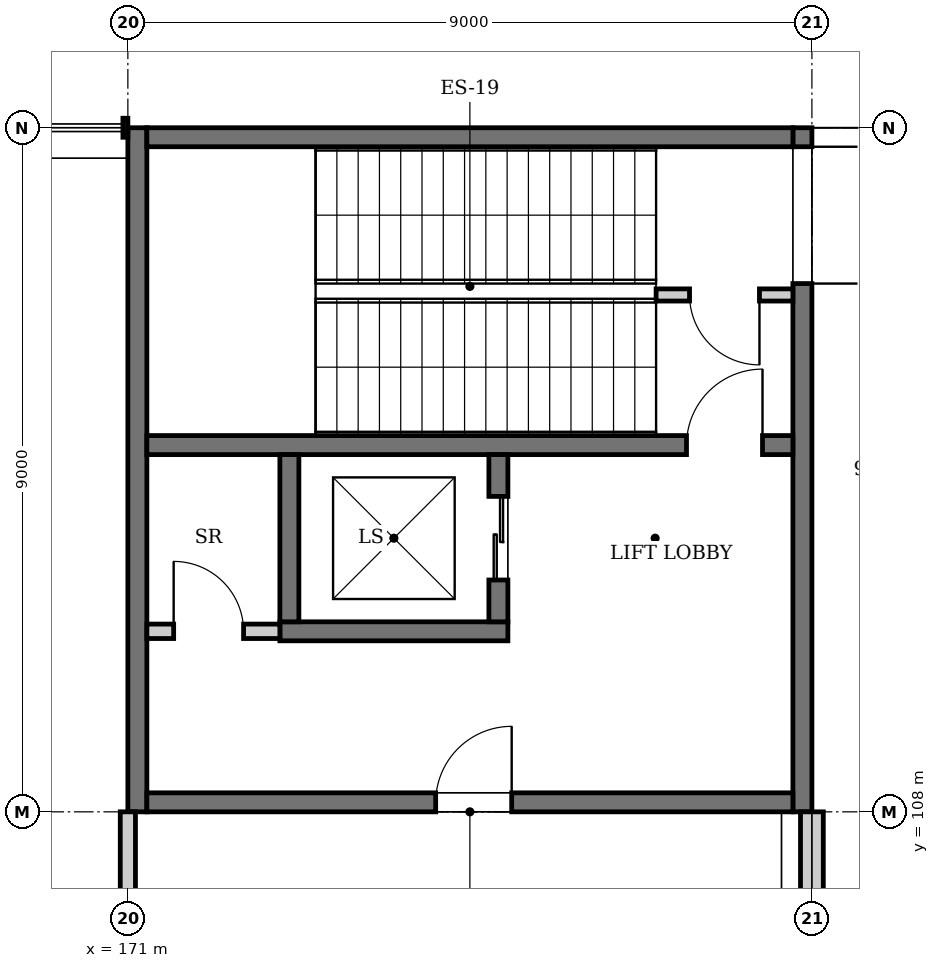
"""IFC4 building model, lengths in metres.
Left out: names, types, materials, properties, quantities, classifications, styles, units other than length and angle.
Written with IfcOpenShell. Run it as: python <this file> out.ifc"""

import sys

from ifc_helpers import new_model, si_unit, direction, frame, frame_2d, origin, place, context, subcontext, project, spatial, rectangle, extrude, element, fill, save


model = new_model("IFC4")
c1 = context("Model", 3, precision=1e-05, world=origin(), true_north=direction((0.0, 1.0)))
c2 = subcontext(c1, "Body", "Model", "MODEL_VIEW")
j1 = project(units=[si_unit("LENGTHUNIT", "METRE"), si_unit("PLANEANGLEUNIT", "RADIAN")], contexts=[c1])
p1 = place(None, origin())
s1 = spatial("IfcSite", under=j1, at=p1, CompositionType="ELEMENT")
p2 = place(p1, origin())
s2 = spatial("IfcBuilding", under=s1, at=p2, CompositionType="ELEMENT")
p3 = place(p2, origin())
s3 = spatial("IfcBuildingStorey", under=s2, at=p3, CompositionType="ELEMENT", Elevation=0.0)
p4 = place(p3, frame((171.125, 108.0, 0.0), z_axis=(0.0, 0.0, 1.0), x_axis=(0.0, 1.0, 0.0)))
e1 = element("IfcWall", 1, at=p4, inside=s3, PredefinedType="SHEAR", context=c2, shape_type="SweptSolid", body=[
    extrude(rectangle(XDim=9.0, YDim=0.25, at=frame_2d((4.5, 0.0))), origin(), (0.0, 0.0, 1.0), 6.0),
])
p5 = place(p3, frame((179.875, 108.0, 0.0), z_axis=(0.0, 0.0, 1.0), x_axis=(0.0, 1.0, 0.0)))
e2 = element("IfcWall", 2, at=p5, inside=s3, PredefinedType="SHEAR", context=c2, shape_type="SweptSolid", body=[
    extrude(rectangle(XDim=9.0, YDim=0.25, at=frame_2d((4.5, 0.0))), origin(), (0.0, 0.0, 1.0), 6.0),
])
p6 = place(p5, frame((6.95, 0.0, 0.0)))
e3 = element("IfcOpeningElement", 3, at=p6, cuts=e2, PredefinedType="OPENING", context=c2, shape_type="SweptSolid", body=[
    extrude(rectangle(XDim=1.8, YDim=2.4, at=frame_2d((0.9, 1.2))), frame((0.0, 0.135, 0.0), z_axis=(0.0, -1.0, 0.0), x_axis=(1.0, 0.0, 0.0)), (0.0, 0.0, 1.0), 0.27),
])
p7 = place(p3, frame((171.25, 108.125, 0.0), z_axis=(0.0, 0.0, 1.0), x_axis=(1.0, 0.0, 0.0)))
e4 = element("IfcWall", 4, at=p7, inside=s3, PredefinedType="SHEAR", context=c2, shape_type="SweptSolid", body=[
    extrude(rectangle(XDim=8.5, YDim=0.25, at=frame_2d((4.25, 0.0))), origin(), (0.0, 0.0, 1.0), 6.0),
])
p8 = place(p7, frame((3.8, 0.0, 0.0)))
e5 = element("IfcOpeningElement", 5, at=p8, cuts=e4, PredefinedType="OPENING", context=c2, shape_type="SweptSolid", body=[
    extrude(rectangle(XDim=1.0, YDim=2.1, at=frame_2d((0.5, 1.05))), frame((0.0, 0.135, 0.0), z_axis=(0.0, -1.0, 0.0), x_axis=(1.0, 0.0, 0.0)), (0.0, 0.0, 1.0), 0.27),
])
p9 = place(p3, frame((171.25, 116.875, 0.0), z_axis=(0.0, 0.0, 1.0), x_axis=(1.0, 0.0, 0.0)))
e6 = element("IfcWall", 6, at=p9, inside=s3, PredefinedType="SHEAR", context=c2, shape_type="SweptSolid", body=[
    extrude(rectangle(XDim=8.5, YDim=0.25, at=frame_2d((4.25, 0.0))), origin(), (0.0, 0.0, 1.0), 6.0),
])
p10 = place(p3, frame((180.0, 99.154, 0.0), z_axis=(0.0, 0.0, 1.0), x_axis=(0.0, 1.0, 0.0)))
e7 = element("IfcWall", 7, at=p10, inside=s3, PredefinedType="SOLIDWALL", context=c2, shape_type="SweptSolid", body=[
    extrude(rectangle(XDim=8.846, YDim=0.3, at=frame_2d((4.423, 0.0))), origin(), (0.0, 0.0, 1.0), 5.444),
])
p11 = place(p10, frame((1.646, 0.0, 0.6)))
e8 = element("IfcOpeningElement", 8, at=p11, cuts=e7, PredefinedType="OPENING", context=c2, shape_type="SweptSolid", body=[
    extrude(rectangle(XDim=0.9, YDim=2.7, at=frame_2d((0.45, 1.35))), frame((0.0, 0.16, 0.0), z_axis=(0.0, -1.0, 0.0), x_axis=(1.0, 0.0, 0.0)), (0.0, 0.0, 1.0), 0.32),
])
p12 = place(p10, frame((6.146, 0.0, 0.6)))
e9 = element("IfcOpeningElement", 9, at=p12, cuts=e7, PredefinedType="OPENING", context=c2, shape_type="SweptSolid", body=[
    extrude(rectangle(XDim=0.9, YDim=2.7, at=frame_2d((0.45, 1.35))), frame((0.0, 0.16, 0.0), z_axis=(0.0, -1.0, 0.0), x_axis=(1.0, 0.0, 0.0)), (0.0, 0.0, 1.0), 0.32),
])
p13 = place(p3, frame((179.75, 112.825, 0.0), z_axis=(0.0, 0.0, 1.0), x_axis=(-1.0, 0.0, 0.0)))
e10 = element("IfcWall", 10, at=p13, inside=s3, PredefinedType="SOLIDWALL", context=c2, shape_type="SweptSolid", body=[
    extrude(rectangle(XDim=8.5, YDim=0.25, at=frame_2d((4.25, 0.0))), origin(), (0.0, 0.0, 1.0), 5.75),
])
p14 = place(p13, frame((0.4, 0.0, 0.0)))
e11 = element("IfcOpeningElement", 11, at=p14, cuts=e10, PredefinedType="OPENING", context=c2, shape_type="SweptSolid", body=[
    extrude(rectangle(XDim=1.0, YDim=2.1, at=frame_2d((0.5, 1.05))), frame((0.0, 0.135, 0.0), z_axis=(0.0, -1.0, 0.0), x_axis=(1.0, 0.0, 0.0)), (0.0, 0.0, 1.0), 0.27),
])
p15 = place(p3, frame((173.0, 110.375, 0.0), z_axis=(0.0, 0.0, 1.0), x_axis=(1.0, 0.0, 0.0)))
e12 = element("IfcWall", 12, at=p15, inside=s3, PredefinedType="SOLIDWALL", context=c2, shape_type="SweptSolid", body=[
    extrude(rectangle(XDim=3.0, YDim=0.25, at=frame_2d((1.5, 0.0))), origin(), (0.0, 0.0, 1.0), 6.0),
])
p16 = place(p3, frame((173.125, 110.5, 0.0), z_axis=(0.0, 0.0, 1.0), x_axis=(0.0, 1.0, 0.0)))
e13 = element("IfcWall", 13, at=p16, inside=s3, PredefinedType="SOLIDWALL", context=c2, shape_type="SweptSolid", body=[
    extrude(rectangle(XDim=2.2, YDim=0.25, at=frame_2d((1.1, 0.0))), origin(), (0.0, 0.0, 1.0), 6.0),
])
p17 = place(p3, frame((175.875, 110.5, 0.0), z_axis=(0.0, 0.0, 1.0), x_axis=(0.0, 1.0, 0.0)))
e14 = element("IfcWall", 14, at=p17, inside=s3, PredefinedType="SOLIDWALL", context=c2, shape_type="SweptSolid", body=[
    extrude(rectangle(XDim=2.2, YDim=0.25, at=frame_2d((1.1, 0.0))), origin(), (0.0, 0.0, 1.0), 6.0),
])
p18 = place(p17, frame((0.55, 0.0, 0.0)))
e15 = element("IfcOpeningElement", 15, at=p18, cuts=e14, PredefinedType="OPENING", context=c2, shape_type="SweptSolid", body=[
    extrude(rectangle(XDim=1.1, YDim=2.1, at=frame_2d((0.55, 1.05))), frame((0.0, 0.135, 0.0), z_axis=(0.0, -1.0, 0.0), x_axis=(1.0, 0.0, 0.0)), (0.0, 0.0, 1.0), 0.27),
])
p19 = place(p3, frame((179.75, 114.8, 0.0), z_axis=(0.0, 0.0, 1.0), x_axis=(-1.0, 0.0, 0.0)))
e16 = element("IfcWall", 16, at=p19, inside=s3, PredefinedType="PARTITIONING", context=c2, shape_type="SweptSolid", body=[
    extrude(rectangle(XDim=1.8, YDim=0.16, at=frame_2d((0.9, 0.0))), origin(), (0.0, 0.0, 1.0), 5.75),
])
p20 = place(p19, frame((0.44, 0.0, 0.0)))
e17 = element("IfcOpeningElement", 17, at=p20, cuts=e16, PredefinedType="OPENING", context=c2, shape_type="SweptSolid", body=[
    extrude(rectangle(XDim=0.92, YDim=2.1, at=frame_2d((0.46, 1.05))), frame((0.0, 0.09, 0.0), z_axis=(0.0, -1.0, 0.0), x_axis=(1.0, 0.0, 0.0)), (0.0, 0.0, 1.0), 0.18),
])
p21 = place(p3, frame((171.25, 110.375, 0.0), z_axis=(0.0, 0.0, 1.0), x_axis=(1.0, 0.0, 0.0)))
e18 = element("IfcWall", 18, at=p21, inside=s3, PredefinedType="PARTITIONING", context=c2, shape_type="SweptSolid", body=[
    extrude(rectangle(XDim=1.75, YDim=0.19, at=frame_2d((0.875, 0.0))), origin(), (0.0, 0.0, 1.0), 5.75),
])
p22 = place(p21, frame((0.353, 0.0, 0.0)))
e19 = element("IfcOpeningElement", 19, at=p22, cuts=e18, PredefinedType="OPENING", context=c2, shape_type="SweptSolid", body=[
    extrude(rectangle(XDim=0.92, YDim=2.1, at=frame_2d((0.46, 1.05))), frame((0.0, 0.105, 0.0), z_axis=(0.0, -1.0, 0.0), x_axis=(1.0, 0.0, 0.0)), (0.0, 0.0, 1.0), 0.21),
])
p23 = place(p3, frame((171.0, 99.164, 0.0), z_axis=(0.0, 0.0, 1.0), x_axis=(0.0, 1.0, 0.0)))
e20 = element("IfcWall", 20, at=p23, inside=s3, PredefinedType="PARTITIONING", context=c2, shape_type="SweptSolid", body=[
    extrude(rectangle(XDim=8.836, YDim=0.2, at=frame_2d((4.418, 0.0))), origin(), (0.0, 0.0, 1.0), 5.322),
])
p24 = place(p23, frame((3.886, 0.0, 0.0)))
e21 = element("IfcOpeningElement", 21, at=p24, cuts=e20, PredefinedType="OPENING", context=c2, shape_type="SweptSolid", body=[
    extrude(rectangle(XDim=1.0, YDim=2.1, at=frame_2d((0.5, 1.05))), frame((0.0, 0.11, 0.0), z_axis=(0.0, -1.0, 0.0), x_axis=(1.0, 0.0, 0.0)), (0.0, 0.0, 1.0), 0.22),
])
p25 = place(p6, frame((1.8, 0.0, 0.0), z_axis=(0.0, 0.0, 1.0), x_axis=(-1.0, 0.0, 0.0)))
e22 = element("IfcDoor", 22, at=p25, inside=s3, OperationType="DOUBLE_DOOR_SINGLE_SWING", PredefinedType="DOOR", context=c2, shape_type="SweptSolid", body=[
    extrude(rectangle(XDim=1.8, YDim=2.4, at=frame_2d((0.9, 1.2))), frame((0.0, 0.025, 0.0), z_axis=(0.0, -1.0, 0.0), x_axis=(1.0, 0.0, 0.0)), (0.0, 0.0, 1.0), 0.05),
])
fill(e3, e22)
p26 = place(p18, origin())
e23 = element("IfcDoor", 23, at=p26, inside=s3, OperationType="DOUBLE_DOOR_SLIDING", PredefinedType="DOOR", context=c2, shape_type="SweptSolid", body=[
    extrude(rectangle(XDim=1.1, YDim=2.1, at=frame_2d((0.55, 1.05))), frame((0.0, 0.025, 0.0), z_axis=(0.0, -1.0, 0.0), x_axis=(1.0, 0.0, 0.0)), (0.0, 0.0, 1.0), 0.05),
])
fill(e15, e23)
p27 = place(p14, frame((1.0, 0.0, 0.0), z_axis=(0.0, 0.0, 1.0), x_axis=(-1.0, 0.0, 0.0)))
e24 = element("IfcDoor", 24, at=p27, inside=s3, OperationType="SINGLE_SWING_RIGHT", PredefinedType="DOOR", context=c2, shape_type="SweptSolid", body=[
    extrude(rectangle(XDim=1.0, YDim=2.1, at=frame_2d((0.5, 1.05))), frame((0.0, 0.025, 0.0), z_axis=(0.0, -1.0, 0.0), x_axis=(1.0, 0.0, 0.0)), (0.0, 0.0, 1.0), 0.05),
])
fill(e11, e24)
p28 = place(p22, origin())
e25 = element("IfcDoor", 25, at=p28, inside=s3, OperationType="SINGLE_SWING_LEFT", PredefinedType="DOOR", context=c2, shape_type="SweptSolid", body=[
    extrude(rectangle(XDim=0.92, YDim=2.1, at=frame_2d((0.46, 1.05))), frame((0.0, 0.025, 0.0), z_axis=(0.0, -1.0, 0.0), x_axis=(1.0, 0.0, 0.0)), (0.0, 0.0, 1.0), 0.05),
])
fill(e19, e25)
p29 = place(p20, origin())
e26 = element("IfcDoor", 26, at=p29, inside=s3, OperationType="SINGLE_SWING_LEFT", PredefinedType="DOOR", context=c2, shape_type="SweptSolid", body=[
    extrude(rectangle(XDim=0.92, YDim=2.1, at=frame_2d((0.46, 1.05))), frame((0.0, 0.025, 0.0), z_axis=(0.0, -1.0, 0.0), x_axis=(1.0, 0.0, 0.0)), (0.0, 0.0, 1.0), 0.05),
])
fill(e17, e26)
p30 = place(p8, origin())
e27 = element("IfcDoor", 27, at=p30, inside=s3, OperationType="SINGLE_SWING_RIGHT", PredefinedType="DOOR", context=c2, shape_type="SweptSolid", body=[
    extrude(rectangle(XDim=1.0, YDim=2.1, at=frame_2d((0.5, 1.05))), frame((0.0, 0.025, 0.0), z_axis=(0.0, -1.0, 0.0), x_axis=(1.0, 0.0, 0.0)), (0.0, 0.0, 1.0), 0.05),
])
fill(e5, e27)
save(model, sys.argv[1])
